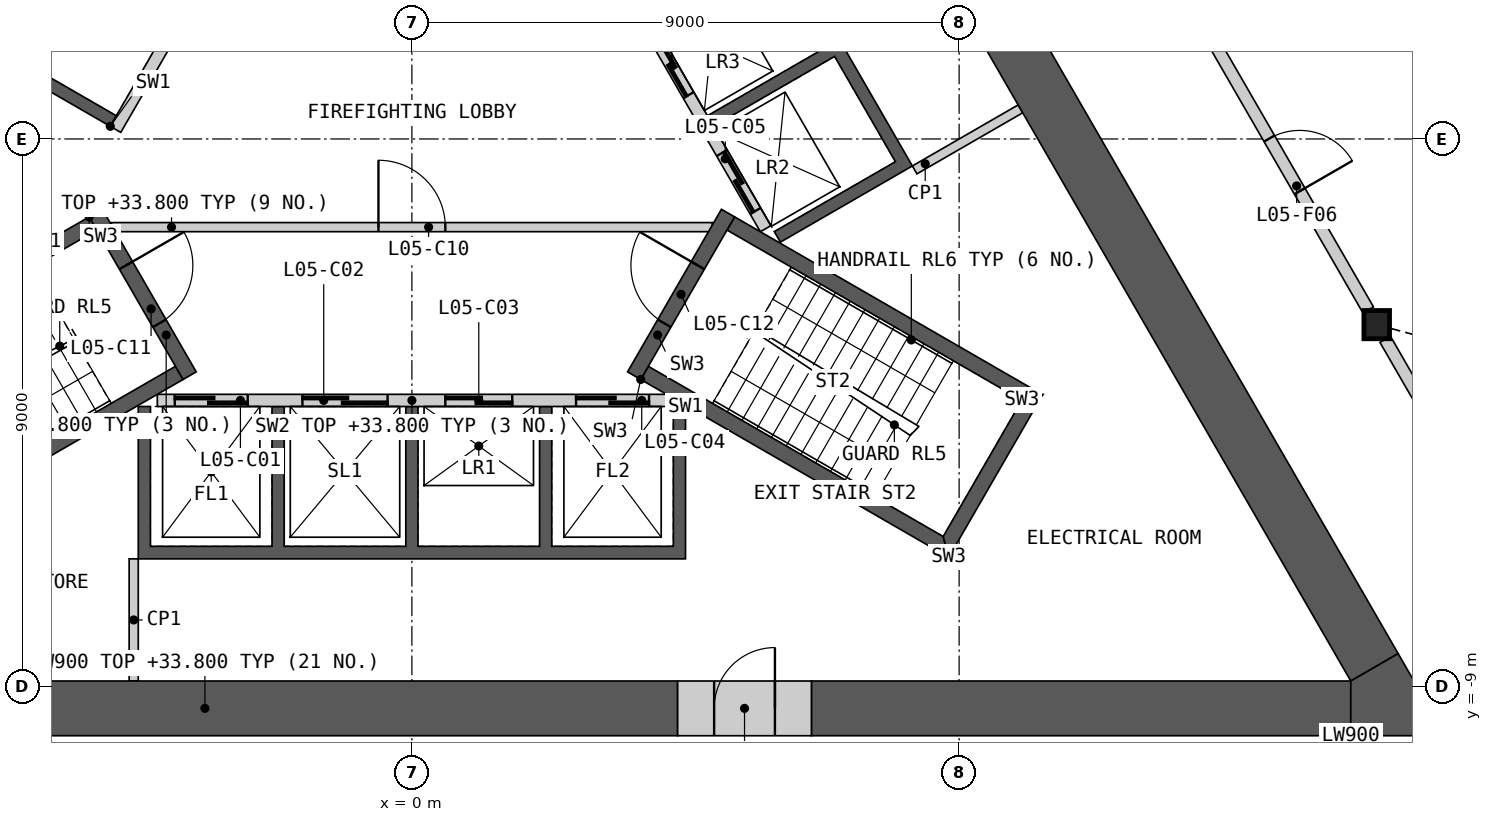
"""IFC4 building model, lengths in metres.
Left out: names, types, materials, properties, quantities, classifications, styles, units other than length and angle.
Written with IfcOpenShell. Run it as: python <this file> out.ifc"""

import sys

from ifc_helpers import new_model, si_unit, direction, frame, frame_2d, origin, origin_2d, place, context, subcontext, project, spatial, polyline, rectangle, i_section, outline, extrude, element, fill, save


model = new_model("IFC4")
c1 = context("Model", 3, precision=1e-05, world=origin(), true_north=direction((0.0, 1.0)))
c2 = subcontext(c1, "Body", "Model", "MODEL_VIEW")
j1 = project(units=[si_unit("LENGTHUNIT", "METRE"), si_unit("PLANEANGLEUNIT", "RADIAN")], contexts=[c1])
p1 = place(None, origin())
s1 = spatial("IfcSite", under=j1, at=p1, CompositionType="ELEMENT")
p2 = place(p1, origin())
s2 = spatial("IfcBuilding", under=s1, at=p2, CompositionType="ELEMENT")
p3 = place(p2, frame((0.0, 0.0, 30.0)))
s3 = spatial("IfcBuildingStorey", under=s2, at=p3, CompositionType="ELEMENT", Elevation=30.0)
p4 = place(p3, frame((15.868, -3.054, 0.0), z_axis=(0.0, 0.0, 1.0), x_axis=(1.0, 0.0, 0.0)))
e1 = element("IfcColumn", 1, at=p4, inside=s3, PredefinedType="COLUMN", context=c2, shape_type="SweptSolid", body=[
    extrude(i_section(OverallWidth=0.421, OverallDepth=0.465, WebThickness=0.045, FlangeThickness=0.072, at=origin_2d()), origin(), (0.0, 0.0, 1.0), 4.2),
])
p5 = place(p3, origin())
e2 = element("IfcWall", 2, at=p5, inside=s3, PredefinedType="SHEAR", context=c2, shape_type="SweptSolid", body=[
    extrude(outline(polyline([(4.5, -4.4), (4.5, -6.906), (-4.5, -6.906), (-4.5, -4.4), (-4.3, -4.4), (-4.3, -6.7), (-2.3, -6.7), (-2.3, -4.4), (-2.1, -4.4), (-2.1, -6.7), (-0.1, -6.7), (-0.1, -4.4), (0.1, -4.4), (0.1, -6.7), (2.1, -6.7), (2.1, -4.4), (2.3, -4.4), (2.3, -6.7), (4.3, -6.7), (4.3, -4.4), (4.5, -4.4)])), origin(), (0.0, 0.0, 1.0), 3.8),
])
p6 = place(p3, frame((-4.187, -4.3, 0.0), z_axis=(0.0, 0.0, 1.0), x_axis=(1.0, 0.0, 0.0)))
e3 = element("IfcWall", 3, at=p6, inside=s3, PredefinedType="SOLIDWALL", context=c2, shape_type="SweptSolid", body=[
    extrude(rectangle(XDim=8.373, YDim=0.2, at=frame_2d((4.187, 0.0))), origin(), (0.0, 0.0, 1.0), 3.8),
])
p7 = place(p6, frame((0.287, 0.0, 0.0)))
e4 = element("IfcOpeningElement", 4, at=p7, cuts=e3, PredefinedType="OPENING", context=c2, shape_type="SweptSolid", body=[
    extrude(rectangle(XDim=1.2, YDim=2.1, at=frame_2d((0.6, 1.05))), frame((0.0, 0.11, 0.0), z_axis=(0.0, -1.0, 0.0), x_axis=(1.0, 0.0, 0.0)), (0.0, 0.0, 1.0), 0.22),
])
p8 = place(p6, frame((2.387, 0.0, 0.0)))
e5 = element("IfcOpeningElement", 5, at=p8, cuts=e3, PredefinedType="OPENING", context=c2, shape_type="SweptSolid", body=[
    extrude(rectangle(XDim=1.4, YDim=2.1, at=frame_2d((0.7, 1.05))), frame((0.0, 0.11, 0.0), z_axis=(0.0, -1.0, 0.0), x_axis=(1.0, 0.0, 0.0)), (0.0, 0.0, 1.0), 0.22),
])
p9 = place(p6, frame((4.737, 0.0, 0.0)))
e6 = element("IfcOpeningElement", 6, at=p9, cuts=e3, PredefinedType="OPENING", context=c2, shape_type="SweptSolid", body=[
    extrude(rectangle(XDim=1.1, YDim=2.1, at=frame_2d((0.55, 1.05))), frame((0.0, 0.11, 0.0), z_axis=(0.0, -1.0, 0.0), x_axis=(1.0, 0.0, 0.0)), (0.0, 0.0, 1.0), 0.22),
])
p10 = place(p6, frame((6.887, 0.0, 0.0)))
e7 = element("IfcOpeningElement", 7, at=p10, cuts=e3, PredefinedType="OPENING", context=c2, shape_type="SweptSolid", body=[
    extrude(rectangle(XDim=1.2, YDim=2.1, at=frame_2d((0.6, 1.05))), frame((0.0, 0.11, 0.0), z_axis=(0.0, -1.0, 0.0), x_axis=(1.0, 0.0, 0.0)), (0.0, 0.0, 1.0), 0.22),
])
p11 = place(p3, origin())
e8 = element("IfcWall", 8, at=p11, inside=s3, PredefinedType="SHEAR", context=c2, shape_type="SweptSolid", body=[
    extrude(outline(polyline([(2.66, 4.192), (4.831, 5.445), (8.231, -0.444), (6.061, -1.697), (5.96, -1.524), (7.952, -0.374), (6.952, 1.358), (4.96, 0.208), (4.861, 0.381), (6.852, 1.531), (5.852, 3.263), (3.861, 2.113), (3.76, 2.287), (5.752, 3.437), (4.752, 5.169), (2.76, 4.019), (2.66, 4.192)])), origin(), (0.0, 0.0, 1.0), 3.8),
])
p12 = place(p3, frame((5.817, -1.476, 0.0), z_axis=(0.0, 0.0, 1.0), x_axis=(-0.500002616675, 0.866023893041, 0.0)))
e9 = element("IfcWall", 9, at=p12, inside=s3, PredefinedType="SOLIDWALL", context=c2, shape_type="SweptSolid", body=[
    extrude(rectangle(XDim=8.373, YDim=0.2, at=frame_2d((4.187, 0.0))), origin(), (0.0, 0.0, 1.0), 3.8),
])
p13 = place(p12, frame((0.337, 0.0, 0.0)))
e10 = element("IfcOpeningElement", 10, at=p13, cuts=e9, PredefinedType="OPENING", context=c2, shape_type="SweptSolid", body=[
    extrude(rectangle(XDim=1.1, YDim=2.1, at=frame_2d((0.55, 1.05))), frame((0.0, 0.11, 0.0), z_axis=(0.0, -1.0, 0.0), x_axis=(1.0, 0.0, 0.0)), (0.0, 0.0, 1.0), 0.22),
])
p14 = place(p12, frame((2.537, 0.0, 0.0)))
e11 = element("IfcOpeningElement", 11, at=p14, cuts=e9, PredefinedType="OPENING", context=c2, shape_type="SweptSolid", body=[
    extrude(rectangle(XDim=1.1, YDim=2.1, at=frame_2d((0.55, 1.05))), frame((0.0, 0.11, 0.0), z_axis=(0.0, -1.0, 0.0), x_axis=(1.0, 0.0, 0.0)), (0.0, 0.0, 1.0), 0.22),
])
p15 = place(p12, frame((4.737, 0.0, 0.0)))
e12 = element("IfcOpeningElement", 12, at=p15, cuts=e9, PredefinedType="OPENING", context=c2, shape_type="SweptSolid", body=[
    extrude(rectangle(XDim=1.1, YDim=2.1, at=frame_2d((0.55, 1.05))), frame((0.0, 0.11, 0.0), z_axis=(0.0, -1.0, 0.0), x_axis=(1.0, 0.0, 0.0)), (0.0, 0.0, 1.0), 0.22),
])
p16 = place(p12, frame((7.037, 0.0, 0.0)))
e13 = element("IfcOpeningElement", 13, at=p16, cuts=e9, PredefinedType="OPENING", context=c2, shape_type="SweptSolid", body=[
    extrude(rectangle(XDim=0.9, YDim=2.1, at=frame_2d((0.45, 1.05))), frame((0.0, 0.11, 0.0), z_axis=(0.0, -1.0, 0.0), x_axis=(1.0, 0.0, 0.0)), (0.0, 0.0, 1.0), 0.22),
])
p17 = place(p3, origin())
e14 = element("IfcWall", 14, at=p17, inside=s3, PredefinedType="SHEAR", context=c2, shape_type="SweptSolid", body=[
    extrude(outline(polyline([(-4.96, 0.208), (-7.131, 1.461), (-3.731, 7.35), (-1.561, 6.097), (-1.66, 5.924), (-3.652, 7.074), (-5.752, 3.437), (-3.76, 2.287), (-3.861, 2.113), (-5.852, 3.263), (-6.852, 1.531), (-4.861, 0.381), (-4.96, 0.208)])), origin(), (0.0, 0.0, 1.0), 3.8),
])
p18 = place(p3, frame((-1.631, 5.776, 0.0), z_axis=(0.0, 0.0, 1.0), x_axis=(-0.499992876559, -0.866029516466, 0.0)))
e15 = element("IfcWall", 15, at=p18, inside=s3, PredefinedType="SOLIDWALL", context=c2, shape_type="SweptSolid", body=[
    extrude(rectangle(XDim=6.486, YDim=0.2, at=frame_2d((3.243, 0.0))), origin(), (0.0, 0.0, 1.0), 3.8),
])
p19 = place(p18, frame((1.537, 0.0, 0.0)))
e16 = element("IfcOpeningElement", 16, at=p19, cuts=e15, PredefinedType="OPENING", context=c2, shape_type="SweptSolid", body=[
    extrude(rectangle(XDim=0.9, YDim=2.1, at=frame_2d((0.45, 1.05))), frame((0.0, 0.11, 0.0), z_axis=(0.0, -1.0, 0.0), x_axis=(1.0, 0.0, 0.0)), (0.0, 0.0, 1.0), 0.22),
])
p20 = place(p3, frame((-4.941, -1.45, 0.0), z_axis=(0.0, 0.0, 1.0), x_axis=(1.0, 0.0, 0.0)))
e17 = element("IfcWall", 17, at=p20, inside=s3, PredefinedType="PARTITIONING", context=c2, shape_type="SweptSolid", body=[
    extrude(rectangle(XDim=9.882, YDim=0.15, at=frame_2d((4.941, 0.0))), origin(), (0.0, 0.0, 1.0), 3.8),
])
p21 = place(p20, frame((4.391, 0.0, 0.0)))
e18 = element("IfcOpeningElement", 18, at=p21, cuts=e17, PredefinedType="OPENING", context=c2, shape_type="SweptSolid", body=[
    extrude(rectangle(XDim=1.1, YDim=2.1, at=frame_2d((0.55, 1.05))), frame((0.0, 0.085, 0.0), z_axis=(0.0, -1.0, 0.0), x_axis=(1.0, 0.0, 0.0)), (0.0, 0.0, 1.0), 0.17),
])
p22 = place(p3, origin())
e19 = element("IfcWall", 19, at=p22, inside=s3, PredefinedType="SHEAR", context=c2, shape_type="SweptSolid", body=[
    extrude(outline(polyline([(-5.307, -1.281), (-10.374, -4.206), (-10.032, -4.298), (-5.182, -1.498), (-5.307, -1.281)])), origin(), (0.0, 0.0, 1.0), 3.8),
])
p23 = place(p3, origin())
e20 = element("IfcWall", 20, at=p23, inside=s3, PredefinedType="SHEAR", context=c2, shape_type="SweptSolid", body=[
    extrude(outline(polyline([(-8.738, -6.539), (-8.83, -6.881), (-3.763, -3.956), (-3.888, -3.739), (-8.738, -6.539)])), origin(), (0.0, 0.0, 1.0), 3.8),
])
p24 = place(p3, frame((-5.199, -1.219, 0.0), z_axis=(0.0, 0.0, 1.0), x_axis=(0.499982516597, -0.866035497597, 0.0)))
e21 = element("IfcWall", 21, at=p24, inside=s3, PredefinedType="SHEAR", context=c2, shape_type="SweptSolid", body=[
    extrude(rectangle(XDim=3.088, YDim=0.25, at=frame_2d((1.544, 0.0))), origin(), (0.0, 0.0, 1.0), 3.8),
])
p25 = place(p24, frame((0.994, 0.0, 0.0)))
e22 = element("IfcOpeningElement", 22, at=p25, cuts=e21, PredefinedType="OPENING", context=c2, shape_type="SweptSolid", body=[
    extrude(rectangle(XDim=1.1, YDim=2.1, at=frame_2d((0.55, 1.05))), frame((0.0, 0.135, 0.0), z_axis=(0.0, -1.0, 0.0), x_axis=(1.0, 0.0, 0.0)), (0.0, 0.0, 1.0), 0.27),
])
p26 = place(p3, origin())
e23 = element("IfcWall", 23, at=p26, inside=s3, PredefinedType="SHEAR", context=c2, shape_type="SweptSolid", body=[
    extrude(outline(polyline([(3.763, -3.956), (8.83, -6.881), (8.738, -6.539), (3.888, -3.739), (3.763, -3.956)])), origin(), (0.0, 0.0, 1.0), 3.8),
])
p27 = place(p3, origin())
e24 = element("IfcWall", 24, at=p27, inside=s3, PredefinedType="SHEAR", context=c2, shape_type="SweptSolid", body=[
    extrude(outline(polyline([(8.83, -6.881), (10.374, -4.206), (10.032, -4.298), (8.738, -6.539), (8.83, -6.881)])), origin(), (0.0, 0.0, 1.0), 3.8),
])
p28 = place(p3, origin())
e25 = element("IfcWall", 25, at=p28, inside=s3, PredefinedType="SHEAR", context=c2, shape_type="SweptSolid", body=[
    extrude(outline(polyline([(10.032, -4.298), (10.374, -4.206), (5.307, -1.281), (5.182, -1.498), (10.032, -4.298)])), origin(), (0.0, 0.0, 1.0), 3.8),
])
p29 = place(p3, frame((3.655, -3.893, 0.0), z_axis=(0.0, 0.0, 1.0), x_axis=(0.499982516597, 0.866035497597, 0.0)))
e26 = element("IfcWall", 26, at=p29, inside=s3, PredefinedType="SHEAR", context=c2, shape_type="SweptSolid", body=[
    extrude(rectangle(XDim=3.088, YDim=0.25, at=frame_2d((1.544, 0.0))), origin(), (0.0, 0.0, 1.0), 3.8),
])
p30 = place(p29, frame((0.994, 0.0, 0.0)))
e27 = element("IfcOpeningElement", 27, at=p30, cuts=e26, PredefinedType="OPENING", context=c2, shape_type="SweptSolid", body=[
    extrude(rectangle(XDim=1.1, YDim=2.1, at=frame_2d((0.55, 1.05))), frame((0.0, 0.135, 0.0), z_axis=(0.0, -1.0, 0.0), x_axis=(1.0, 0.0, 0.0)), (0.0, 0.0, 1.0), 0.27),
])
p31 = place(p3, frame((8.268, -0.509, 0.0), z_axis=(0.0, 0.0, 1.0), x_axis=(0.866035824272, 0.499981950752, 0.0)))
e28 = element("IfcWall", 28, at=p31, inside=s3, PredefinedType="PARTITIONING", context=c2, shape_type="SweptSolid", body=[
    extrude(rectangle(XDim=2.009, YDim=0.15, at=frame_2d((1.004, 0.0))), origin(), (0.0, 0.0, 1.0), 3.8),
])
p32 = place(p3, frame((-4.575, -6.906, 0.0), z_axis=(0.0, 0.0, 1.0), x_axis=(0.0, -1.0, 0.0)))
e29 = element("IfcWall", 29, at=p32, inside=s3, PredefinedType="PARTITIONING", context=c2, shape_type="SweptSolid", body=[
    extrude(rectangle(XDim=2.009, YDim=0.15, at=frame_2d((1.004, 0.0))), origin(), (0.0, 0.0, 1.0), 3.8),
])
p33 = place(p3, frame((-11.179, -9.365, 0.0), z_axis=(0.0, 0.0, 1.0), x_axis=(1.0, 0.0, 0.0)))
e30 = element("IfcWall", 30, at=p33, inside=s3, PredefinedType="SHEAR", context=c2, shape_type="SweptSolid", body=[
    extrude(rectangle(XDim=15.55, YDim=0.9, at=frame_2d((7.775, 0.0))), origin(), (0.0, 0.0, 1.0), 3.8),
])
p34 = place(p3, frame((6.571, -9.365, 0.0), z_axis=(0.0, 0.0, 1.0), x_axis=(1.0, 0.0, 0.0)))
e31 = element("IfcWall", 31, at=p34, inside=s3, PredefinedType="SHEAR", context=c2, shape_type="SweptSolid", body=[
    extrude(rectangle(XDim=8.871, YDim=0.9, at=frame_2d((4.435, 0.0))), origin(), (0.0, 0.0, 1.0), 3.8),
])
p35 = place(p3, frame((15.831, -8.69, 0.0), z_axis=(0.0, 0.0, 1.0), x_axis=(-0.499997452939, 0.866026874326, 0.0)))
e32 = element("IfcWall", 32, at=p35, inside=s3, PredefinedType="SHEAR", context=c2, shape_type="SweptSolid", body=[
    extrude(rectangle(XDim=13.141, YDim=0.9, at=frame_2d((6.571, 0.0))), origin(), (0.0, 0.0, 1.0), 3.8),
])
p36 = place(p3, origin())
e33 = element("IfcWall", 33, at=p36, inside=s3, PredefinedType="SHEAR", context=c2, shape_type="SweptSolid", body=[
    extrude(outline(polyline([(15.441, -9.815), (15.441, -8.915), (16.221, -8.465), (17.0, -9.815), (15.441, -9.815)])), origin(), (0.0, 0.0, 1.0), 3.8),
])
p37 = place(p3, frame((4.371, -9.365, 0.0), z_axis=(0.0, 0.0, 1.0), x_axis=(1.0, 0.0, 0.0)))
e34 = element("IfcWall", 34, at=p37, inside=s3, PredefinedType="SHEAR", context=c2, shape_type="SweptSolid", body=[
    extrude(rectangle(XDim=2.2, YDim=0.9, at=frame_2d((1.1, 0.0))), origin(), (0.0, 0.0, 1.0), 3.8),
])
p38 = place(p37, frame((0.6, 0.0, 0.0)))
e35 = element("IfcOpeningElement", 35, at=p38, cuts=e34, PredefinedType="OPENING", context=c2, shape_type="SweptSolid", body=[
    extrude(rectangle(XDim=1.0, YDim=2.1, at=frame_2d((0.5, 1.05))), frame((0.0, 0.46, 0.0), z_axis=(0.0, -1.0, 0.0), x_axis=(1.0, 0.0, 0.0)), (0.0, 0.0, 1.0), 0.92),
])
p39 = place(p3, frame((10.719, 5.865, 0.0), z_axis=(0.0, 0.0, 1.0), x_axis=(0.49999175339, -0.866030164915, 0.0)))
e36 = element("IfcWall", 36, at=p39, inside=s3, PredefinedType="PARTITIONING", context=c2, shape_type="SweptSolid", body=[
    extrude(rectangle(XDim=10.019, YDim=0.2, at=frame_2d((5.009, 0.0))), origin(), (0.0, 0.0, 1.0), 3.8),
])
p40 = place(p39, frame((6.764, 0.0, 0.0)))
e37 = element("IfcOpeningElement", 37, at=p40, cuts=e36, PredefinedType="OPENING", context=c2, shape_type="SweptSolid", body=[
    extrude(rectangle(XDim=1.0, YDim=2.1, at=frame_2d((0.5, 1.05))), frame((0.0, 0.11, 0.0), z_axis=(0.0, -1.0, 0.0), x_axis=(1.0, 0.0, 0.0)), (0.0, 0.0, 1.0), 0.22),
])
p41 = place(p3, frame((16.008, -3.296, 0.0), z_axis=(0.0, 0.0, 1.0), x_axis=(0.499984737558, -0.86603421538, 0.0)))
e38 = element("IfcWall", 38, at=p41, inside=s3, PredefinedType="PARTITIONING", context=c2, shape_type="SweptSolid", body=[
    extrude(rectangle(XDim=6.473, YDim=0.2, at=frame_2d((3.236, 0.0))), origin(), (0.0, 0.0, 1.0), 3.8),
])
p42 = place(p41, frame((4.512, 0.0, 0.0)))
e39 = element("IfcOpeningElement", 39, at=p42, cuts=e38, PredefinedType="OPENING", context=c2, shape_type="SweptSolid", body=[
    extrude(rectangle(XDim=1.0, YDim=2.1, at=frame_2d((0.5, 1.05))), frame((0.0, 0.11, 0.0), z_axis=(0.0, -1.0, 0.0), x_axis=(1.0, 0.0, 0.0)), (0.0, 0.0, 1.0), 0.22),
])
p43 = place(p7, origin())
e40 = element("IfcDoor", 40, at=p43, inside=s3, OperationType="SLIDING_TO_LEFT", PredefinedType="DOOR", context=c2, shape_type="SweptSolid", body=[
    extrude(rectangle(XDim=1.2, YDim=2.1, at=frame_2d((0.6, 1.05))), frame((0.0, 0.025, 0.0), z_axis=(0.0, -1.0, 0.0), x_axis=(1.0, 0.0, 0.0)), (0.0, 0.0, 1.0), 0.05),
])
fill(e4, e40)
p44 = place(p8, origin())
e41 = element("IfcDoor", 41, at=p44, inside=s3, OperationType="SLIDING_TO_LEFT", PredefinedType="DOOR", context=c2, shape_type="SweptSolid", body=[
    extrude(rectangle(XDim=1.4, YDim=2.1, at=frame_2d((0.7, 1.05))), frame((0.0, 0.025, 0.0), z_axis=(0.0, -1.0, 0.0), x_axis=(1.0, 0.0, 0.0)), (0.0, 0.0, 1.0), 0.05),
])
fill(e5, e41)
p45 = place(p9, origin())
e42 = element("IfcDoor", 42, at=p45, inside=s3, OperationType="SLIDING_TO_LEFT", PredefinedType="DOOR", context=c2, shape_type="SweptSolid", body=[
    extrude(rectangle(XDim=1.1, YDim=2.1, at=frame_2d((0.55, 1.05))), frame((0.0, 0.025, 0.0), z_axis=(0.0, -1.0, 0.0), x_axis=(1.0, 0.0, 0.0)), (0.0, 0.0, 1.0), 0.05),
])
fill(e6, e42)
p46 = place(p10, origin())
e43 = element("IfcDoor", 43, at=p46, inside=s3, OperationType="SLIDING_TO_LEFT", PredefinedType="DOOR", context=c2, shape_type="SweptSolid", body=[
    extrude(rectangle(XDim=1.2, YDim=2.1, at=frame_2d((0.6, 1.05))), frame((0.0, 0.025, 0.0), z_axis=(0.0, -1.0, 0.0), x_axis=(1.0, 0.0, 0.0)), (0.0, 0.0, 1.0), 0.05),
])
fill(e7, e43)
p47 = place(p13, origin())
e44 = element("IfcDoor", 44, at=p47, inside=s3, OperationType="SLIDING_TO_LEFT", PredefinedType="DOOR", context=c2, shape_type="SweptSolid", body=[
    extrude(rectangle(XDim=1.1, YDim=2.1, at=frame_2d((0.55, 1.05))), frame((0.0, 0.025, 0.0), z_axis=(0.0, -1.0, 0.0), x_axis=(1.0, 0.0, 0.0)), (0.0, 0.0, 1.0), 0.05),
])
fill(e10, e44)
p48 = place(p14, origin())
e45 = element("IfcDoor", 45, at=p48, inside=s3, OperationType="SLIDING_TO_LEFT", PredefinedType="DOOR", context=c2, shape_type="SweptSolid", body=[
    extrude(rectangle(XDim=1.1, YDim=2.1, at=frame_2d((0.55, 1.05))), frame((0.0, 0.025, 0.0), z_axis=(0.0, -1.0, 0.0), x_axis=(1.0, 0.0, 0.0)), (0.0, 0.0, 1.0), 0.05),
])
fill(e11, e45)
p49 = place(p21, origin())
e46 = element("IfcDoor", 46, at=p49, inside=s3, OperationType="SINGLE_SWING_LEFT", PredefinedType="DOOR", context=c2, shape_type="SweptSolid", body=[
    extrude(rectangle(XDim=1.1, YDim=2.1, at=frame_2d((0.55, 1.05))), frame((0.0, 0.025, 0.0), z_axis=(0.0, -1.0, 0.0), x_axis=(1.0, 0.0, 0.0)), (0.0, 0.0, 1.0), 0.05),
])
fill(e18, e46)
p50 = place(p25, origin())
e47 = element("IfcDoor", 47, at=p50, inside=s3, OperationType="SINGLE_SWING_LEFT", PredefinedType="DOOR", context=c2, shape_type="SweptSolid", body=[
    extrude(rectangle(XDim=1.1, YDim=2.1, at=frame_2d((0.55, 1.05))), frame((0.0, 0.025, 0.0), z_axis=(0.0, -1.0, 0.0), x_axis=(1.0, 0.0, 0.0)), (0.0, 0.0, 1.0), 0.05),
])
fill(e22, e47)
p51 = place(p30, origin())
e48 = element("IfcDoor", 48, at=p51, inside=s3, OperationType="SINGLE_SWING_RIGHT", PredefinedType="DOOR", context=c2, shape_type="SweptSolid", body=[
    extrude(rectangle(XDim=1.1, YDim=2.1, at=frame_2d((0.55, 1.05))), frame((0.0, 0.025, 0.0), z_axis=(0.0, -1.0, 0.0), x_axis=(1.0, 0.0, 0.0)), (0.0, 0.0, 1.0), 0.05),
])
fill(e27, e48)
p52 = place(p38, origin())
e49 = element("IfcDoor", 49, at=p52, inside=s3, OperationType="SINGLE_SWING_RIGHT", PredefinedType="DOOR", context=c2, shape_type="SweptSolid", body=[
    extrude(rectangle(XDim=1.0, YDim=2.1, at=frame_2d((0.5, 1.05))), frame((0.0, 0.205, 0.0), z_axis=(0.0, -1.0, 0.0), x_axis=(1.0, 0.0, 0.0)), (0.0, 0.0, 1.0), 0.05),
])
fill(e35, e49)
p53 = place(p40, origin())
e50 = element("IfcDoor", 50, at=p53, inside=s3, OperationType="SINGLE_SWING_RIGHT", PredefinedType="DOOR", context=c2, shape_type="SweptSolid", body=[
    extrude(rectangle(XDim=1.0, YDim=2.1, at=frame_2d((0.5, 1.05))), frame((0.0, 0.025, 0.0), z_axis=(0.0, -1.0, 0.0), x_axis=(1.0, 0.0, 0.0)), (0.0, 0.0, 1.0), 0.05),
])
fill(e37, e50)
save(model, sys.argv[1])
